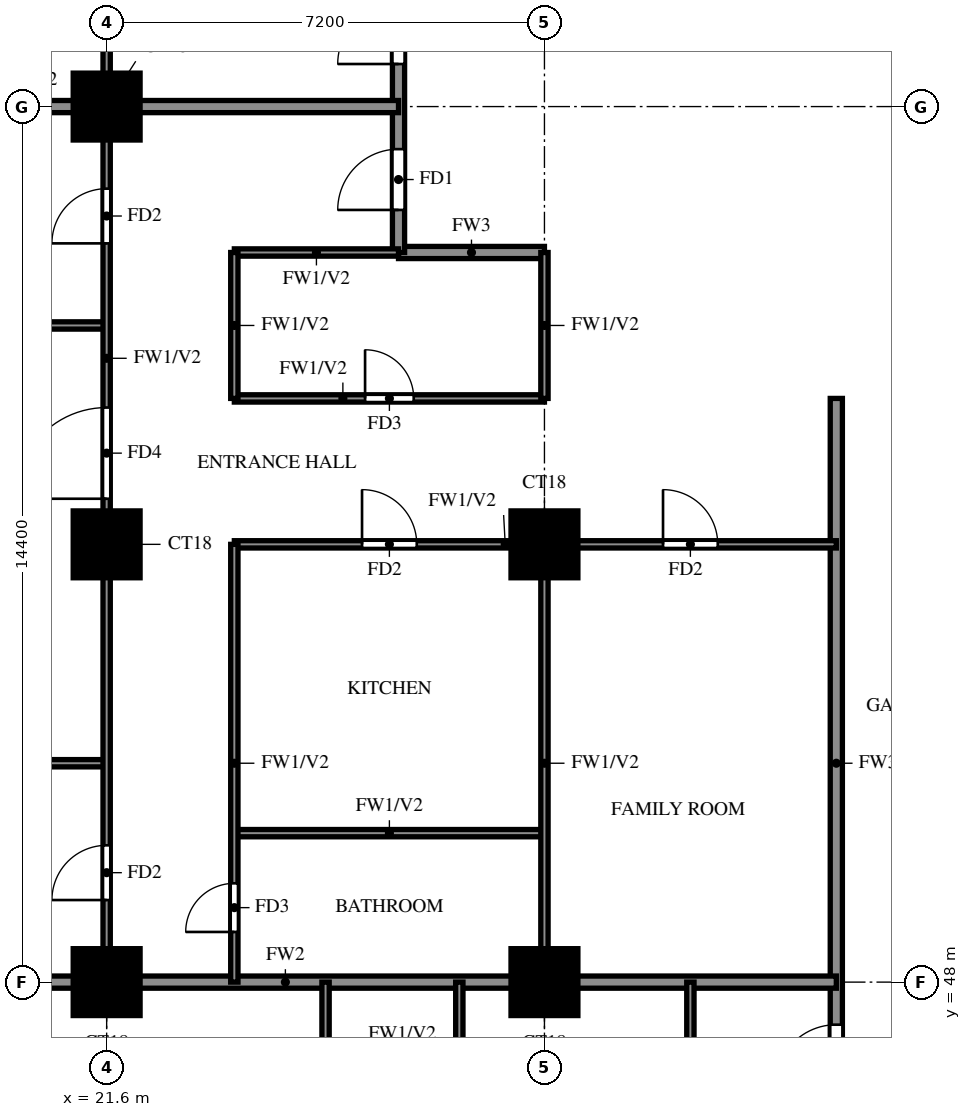
"""IFC4 building model, lengths in metres.
Left out: names, types, materials, properties, quantities, classifications, styles, units other than length and angle.
Written with IfcOpenShell. Run it as: python <this file> out.ifc"""

import sys

from ifc_helpers import new_model, si_unit, direction, frame, frame_2d, origin, origin_2d, place, context, subcontext, project, spatial, rectangle, extrude, source, transform, mapped, element, fill, save


model = new_model("IFC4")
c1 = context("Model", 3, precision=1e-05, world=origin(), true_north=direction((0.0, 1.0)))
c2 = subcontext(c1, "Body", "Model", "MODEL_VIEW")
j1 = project(units=[si_unit("LENGTHUNIT", "METRE"), si_unit("PLANEANGLEUNIT", "RADIAN")], contexts=[c1])
p1 = place(None, origin())
s1 = spatial("IfcSite", under=j1, at=p1, CompositionType="ELEMENT")
p2 = place(p1, origin())
s2 = spatial("IfcBuilding", under=s1, at=p2, CompositionType="ELEMENT")
p3 = place(p2, frame((0.0, 0.0, 116.5)))
s3 = spatial("IfcBuildingStorey", under=s2, at=p3, CompositionType="ELEMENT", Elevation=116.5)
m1 = source(origin(), c2, "Body", "SweptSolid", [
    extrude(rectangle(XDim=1.1, YDim=1.1, at=origin_2d()), origin(), (0.0, 0.0, 1.0), 3.2),
])
for number, where, z_axis, x_axis in (
    (1, (21.6, 48.0, 0.0), (0.0, 0.0, 1.0), (1.0, 0.0, 0.0)),
    (2, (28.8, 48.0, 0.0), (0.0, 0.0, 1.0), (1.0, 0.0, 0.0)),
    (3, (21.6, 55.2, 0.0), (0.0, 0.0, 1.0), (1.0, 0.0, 0.0)),
    (4, (28.8, 55.2, 0.0), (0.0, 0.0, 1.0), (1.0, 0.0, 0.0)),
    (5, (21.6, 62.4, 0.0), (0.0, 0.0, 1.0), (1.0, 0.0, 0.0)),
):
    element("IfcColumn", number, at=place(p3, frame(where, z_axis=z_axis, x_axis=x_axis)), inside=s3, PredefinedType="COLUMN", context=c2, shape_type="MappedRepresentation", body=[
        mapped(m1, transform((0.0, 0.0, 0.0))),
    ])
p4 = place(p3, frame((26.4, 60.0, 0.0), z_axis=(0.0, 0.0, 1.0), x_axis=(1.0, 0.0, 0.0)))
e6 = element("IfcWall", 6, at=p4, inside=s3, PredefinedType="SOLIDWALL", context=c2, shape_type="SweptSolid", body=[
    extrude(rectangle(XDim=2.4, YDim=0.2, at=frame_2d((1.2, 0.0))), origin(), (0.0, 0.0, 1.0), 3.2),
])
p5 = place(p3, frame((26.4, 60.0, 0.0), z_axis=(0.0, 0.0, 1.0), x_axis=(0.0, 1.0, 0.0)))
e7 = element("IfcWall", 7, at=p5, inside=s3, PredefinedType="SOLIDWALL", context=c2, shape_type="SweptSolid", body=[
    extrude(rectangle(XDim=9.6, YDim=0.2, at=frame_2d((4.8, 0.0))), origin(), (0.0, 0.0, 1.0), 3.2),
])
p6 = place(p5, frame((0.7, 0.0, 0.0)))
e8 = element("IfcOpeningElement", 8, at=p6, cuts=e7, PredefinedType="OPENING", context=c2, shape_type="SweptSolid", body=[
    extrude(rectangle(XDim=1.0, YDim=2.1, at=frame_2d((0.5, 1.05))), frame((0.0, 0.11, 0.0), z_axis=(0.0, -1.0, 0.0), x_axis=(1.0, 0.0, 0.0)), (0.0, 0.0, 1.0), 0.22),
])
p7 = place(p5, frame((3.1, 0.0, 0.0)))
e9 = element("IfcOpeningElement", 9, at=p7, cuts=e7, PredefinedType="OPENING", context=c2, shape_type="SweptSolid", body=[
    extrude(rectangle(XDim=1.0, YDim=2.1, at=frame_2d((0.5, 1.05))), frame((0.0, 0.11, 0.0), z_axis=(0.0, -1.0, 0.0), x_axis=(1.0, 0.0, 0.0)), (0.0, 0.0, 1.0), 0.22),
])
p8 = place(p3, frame((33.6, 45.6, 0.0), z_axis=(0.0, 0.0, 1.0), x_axis=(0.0, 1.0, 0.0)))
e10 = element("IfcWall", 10, at=p8, inside=s3, PredefinedType="SOLIDWALL", context=c2, shape_type="SweptSolid", body=[
    extrude(rectangle(XDim=12.0, YDim=0.2, at=frame_2d((6.0, 0.0))), origin(), (0.0, 0.0, 1.0), 3.2),
])
p9 = place(p8, frame((0.7, 0.0, 0.0)))
e11 = element("IfcOpeningElement", 11, at=p9, cuts=e10, PredefinedType="OPENING", context=c2, shape_type="SweptSolid", body=[
    extrude(rectangle(XDim=1.0, YDim=2.1, at=frame_2d((0.5, 1.05))), frame((0.0, 0.11, 0.0), z_axis=(0.0, -1.0, 0.0), x_axis=(1.0, 0.0, 0.0)), (0.0, 0.0, 1.0), 0.22),
])
p10 = place(p3, frame((14.525, 48.0, 0.0), z_axis=(0.0, 0.0, 1.0), x_axis=(1.0, 0.0, 0.0)))
e12 = element("IfcWall", 12, at=p10, inside=s3, PredefinedType="SOLIDWALL", context=c2, shape_type="SweptSolid", body=[
    extrude(rectangle(XDim=19.075, YDim=0.2, at=frame_2d((9.538, 0.0))), origin(), (0.0, 0.0, 1.0), 3.2),
])
p11 = place(p3, frame((14.525, 62.4, 0.0), z_axis=(0.0, 0.0, 1.0), x_axis=(1.0, 0.0, 0.0)))
e13 = element("IfcWall", 13, at=p11, inside=s3, PredefinedType="SOLIDWALL", context=c2, shape_type="SweptSolid", body=[
    extrude(rectangle(XDim=11.875, YDim=0.2, at=frame_2d((5.938, 0.0))), origin(), (0.0, 0.0, 1.0), 3.2),
])
p12 = place(p3, frame((23.7, 50.45, 0.0), z_axis=(0.0, 0.0, 1.0), x_axis=(1.0, 0.0, 0.0)))
e14 = element("IfcWall", 14, at=p12, inside=s3, PredefinedType="PARTITIONING", context=c2, shape_type="SweptSolid", body=[
    extrude(rectangle(XDim=5.1, YDim=0.12, at=frame_2d((2.55, 0.0))), origin(), (0.0, 0.0, 1.0), 3.2),
])
p13 = place(p3, frame((14.525, 51.6, 0.0), z_axis=(0.0, 0.0, 1.0), x_axis=(1.0, 0.0, 0.0)))
e15 = element("IfcWall", 15, at=p13, inside=s3, PredefinedType="PARTITIONING", context=c2, shape_type="SweptSolid", body=[
    extrude(rectangle(XDim=7.075, YDim=0.12, at=frame_2d((3.538, 0.0))), origin(), (0.0, 0.0, 1.0), 2.3),
])
p14 = place(p3, frame((23.7, 55.2, 0.0), z_axis=(0.0, 0.0, 1.0), x_axis=(1.0, 0.0, 0.0)))
e16 = element("IfcWall", 16, at=p14, inside=s3, PredefinedType="PARTITIONING", context=c2, shape_type="SweptSolid", body=[
    extrude(rectangle(XDim=9.9, YDim=0.12, at=frame_2d((4.95, 0.0))), origin(), (0.0, 0.0, 1.0), 3.2),
])
p15 = place(p14, frame((2.1, 0.0, 0.0)))
e17 = element("IfcOpeningElement", 17, at=p15, cuts=e16, PredefinedType="OPENING", context=c2, shape_type="SweptSolid", body=[
    extrude(rectangle(XDim=0.9, YDim=2.1, at=frame_2d((0.45, 1.05))), frame((0.0, 0.07, 0.0), z_axis=(0.0, -1.0, 0.0), x_axis=(1.0, 0.0, 0.0)), (0.0, 0.0, 1.0), 0.14),
])
p16 = place(p14, frame((7.05, 0.0, 0.0)))
e18 = element("IfcOpeningElement", 18, at=p16, cuts=e16, PredefinedType="OPENING", context=c2, shape_type="SweptSolid", body=[
    extrude(rectangle(XDim=0.9, YDim=2.1, at=frame_2d((0.45, 1.05))), frame((0.0, 0.07, 0.0), z_axis=(0.0, -1.0, 0.0), x_axis=(1.0, 0.0, 0.0)), (0.0, 0.0, 1.0), 0.14),
])
p17 = place(p3, frame((23.7, 57.6, 0.0), z_axis=(0.0, 0.0, 1.0), x_axis=(1.0, 0.0, 0.0)))
e19 = element("IfcWall", 19, at=p17, inside=s3, PredefinedType="PARTITIONING", context=c2, shape_type="SweptSolid", body=[
    extrude(rectangle(XDim=5.1, YDim=0.12, at=frame_2d((2.55, 0.0))), origin(), (0.0, 0.0, 1.0), 3.2),
])
p18 = place(p17, frame((2.15, 0.0, 0.0)))
e20 = element("IfcOpeningElement", 20, at=p18, cuts=e19, PredefinedType="OPENING", context=c2, shape_type="SweptSolid", body=[
    extrude(rectangle(XDim=0.8, YDim=2.1, at=frame_2d((0.4, 1.05))), frame((0.0, 0.07, 0.0), z_axis=(0.0, -1.0, 0.0), x_axis=(1.0, 0.0, 0.0)), (0.0, 0.0, 1.0), 0.14),
])
p19 = place(p3, frame((14.525, 58.8, 0.0), z_axis=(0.0, 0.0, 1.0), x_axis=(1.0, 0.0, 0.0)))
e21 = element("IfcWall", 21, at=p19, inside=s3, PredefinedType="PARTITIONING", context=c2, shape_type="SweptSolid", body=[
    extrude(rectangle(XDim=7.075, YDim=0.12, at=frame_2d((3.538, 0.0))), origin(), (0.0, 0.0, 1.0), 2.3),
])
p20 = place(p3, frame((23.7, 60.0, 0.0), z_axis=(0.0, 0.0, 1.0), x_axis=(1.0, 0.0, 0.0)))
e22 = element("IfcWall", 22, at=p20, inside=s3, PredefinedType="PARTITIONING", context=c2, shape_type="SweptSolid", body=[
    extrude(rectangle(XDim=2.7, YDim=0.12, at=frame_2d((1.35, 0.0))), origin(), (0.0, 0.0, 1.0), 3.2),
])
p21 = place(p3, frame((21.6, 48.0, 0.0), z_axis=(0.0, 0.0, 1.0), x_axis=(0.0, 1.0, 0.0)))
e23 = element("IfcWall", 23, at=p21, inside=s3, PredefinedType="PARTITIONING", context=c2, shape_type="SweptSolid", body=[
    extrude(rectangle(XDim=21.6, YDim=0.12, at=frame_2d((10.8, 0.0))), origin(), (0.0, 0.0, 1.0), 3.2),
])
p22 = place(p21, frame((1.35, 0.0, 0.0)))
e24 = element("IfcOpeningElement", 24, at=p22, cuts=e23, PredefinedType="OPENING", context=c2, shape_type="SweptSolid", body=[
    extrude(rectangle(XDim=0.9, YDim=2.1, at=frame_2d((0.45, 1.05))), frame((0.0, 0.07, 0.0), z_axis=(0.0, -1.0, 0.0), x_axis=(1.0, 0.0, 0.0)), (0.0, 0.0, 1.0), 0.14),
])
p23 = place(p21, frame((7.95, 0.0, 0.0)))
e25 = element("IfcOpeningElement", 25, at=p23, cuts=e23, PredefinedType="OPENING", context=c2, shape_type="SweptSolid", body=[
    extrude(rectangle(XDim=1.5, YDim=2.1, at=frame_2d((0.75, 1.05))), frame((0.0, 0.07, 0.0), z_axis=(0.0, -1.0, 0.0), x_axis=(1.0, 0.0, 0.0)), (0.0, 0.0, 1.0), 0.14),
])
p24 = place(p21, frame((12.15, 0.0, 0.0)))
e26 = element("IfcOpeningElement", 26, at=p24, cuts=e23, PredefinedType="OPENING", context=c2, shape_type="SweptSolid", body=[
    extrude(rectangle(XDim=0.9, YDim=2.1, at=frame_2d((0.45, 1.05))), frame((0.0, 0.07, 0.0), z_axis=(0.0, -1.0, 0.0), x_axis=(1.0, 0.0, 0.0)), (0.0, 0.0, 1.0), 0.14),
])
p25 = place(p21, frame((15.75, 0.0, 0.0)))
e27 = element("IfcOpeningElement", 27, at=p25, cuts=e23, PredefinedType="OPENING", context=c2, shape_type="SweptSolid", body=[
    extrude(rectangle(XDim=0.9, YDim=2.1, at=frame_2d((0.45, 1.05))), frame((0.0, 0.07, 0.0), z_axis=(0.0, -1.0, 0.0), x_axis=(1.0, 0.0, 0.0)), (0.0, 0.0, 1.0), 0.14),
])
p26 = place(p21, frame((19.35, 0.0, 0.0)))
e28 = element("IfcOpeningElement", 28, at=p26, cuts=e23, PredefinedType="OPENING", context=c2, shape_type="SweptSolid", body=[
    extrude(rectangle(XDim=0.9, YDim=2.1, at=frame_2d((0.45, 1.05))), frame((0.0, 0.07, 0.0), z_axis=(0.0, -1.0, 0.0), x_axis=(1.0, 0.0, 0.0)), (0.0, 0.0, 1.0), 0.14),
])
p27 = place(p3, frame((23.7, 48.0, 0.0), z_axis=(0.0, 0.0, 1.0), x_axis=(0.0, 1.0, 0.0)))
e29 = element("IfcWall", 29, at=p27, inside=s3, PredefinedType="PARTITIONING", context=c2, shape_type="SweptSolid", body=[
    extrude(rectangle(XDim=7.2, YDim=0.12, at=frame_2d((3.6, 0.0))), origin(), (0.0, 0.0, 1.0), 3.2),
])
p28 = place(p27, frame((0.825, 0.0, 0.0)))
e30 = element("IfcOpeningElement", 30, at=p28, cuts=e29, PredefinedType="OPENING", context=c2, shape_type="SweptSolid", body=[
    extrude(rectangle(XDim=0.8, YDim=2.1, at=frame_2d((0.4, 1.05))), frame((0.0, 0.07, 0.0), z_axis=(0.0, -1.0, 0.0), x_axis=(1.0, 0.0, 0.0)), (0.0, 0.0, 1.0), 0.14),
])
p29 = place(p3, frame((23.7, 57.6, 0.0), z_axis=(0.0, 0.0, 1.0), x_axis=(0.0, 1.0, 0.0)))
e31 = element("IfcWall", 31, at=p29, inside=s3, PredefinedType="PARTITIONING", context=c2, shape_type="SweptSolid", body=[
    extrude(rectangle(XDim=2.4, YDim=0.12, at=frame_2d((1.2, 0.0))), origin(), (0.0, 0.0, 1.0), 3.2),
])
p30 = place(p3, frame((25.2, 39.725, 0.0), z_axis=(0.0, 0.0, 1.0), x_axis=(0.0, 1.0, 0.0)))
e32 = element("IfcWall", 32, at=p30, inside=s3, PredefinedType="PARTITIONING", context=c2, shape_type="SweptSolid", body=[
    extrude(rectangle(XDim=8.275, YDim=0.12, at=frame_2d((4.137, 0.0))), origin(), (0.0, 0.0, 1.0), 3.2),
])
p31 = place(p30, frame((4.525, 0.0, 0.0)))
e33 = element("IfcOpeningElement", 33, at=p31, cuts=e32, PredefinedType="OPENING", context=c2, shape_type="SweptSolid", body=[
    extrude(rectangle(XDim=0.9, YDim=2.1, at=frame_2d((0.45, 1.05))), frame((0.0, 0.07, 0.0), z_axis=(0.0, -1.0, 0.0), x_axis=(1.0, 0.0, 0.0)), (0.0, 0.0, 1.0), 0.14),
])
p32 = place(p3, frame((27.4, 45.6, 0.0), z_axis=(0.0, 0.0, 1.0), x_axis=(0.0, 1.0, 0.0)))
e34 = element("IfcWall", 34, at=p32, inside=s3, PredefinedType="PARTITIONING", context=c2, shape_type="SweptSolid", body=[
    extrude(rectangle(XDim=2.4, YDim=0.12, at=frame_2d((1.2, 0.0))), origin(), (0.0, 0.0, 1.0), 3.2),
])
p33 = place(p3, frame((28.8, 48.0, 0.0), z_axis=(0.0, 0.0, 1.0), x_axis=(0.0, 1.0, 0.0)))
e35 = element("IfcWall", 35, at=p33, inside=s3, PredefinedType="PARTITIONING", context=c2, shape_type="SweptSolid", body=[
    extrude(rectangle(XDim=7.2, YDim=0.12, at=frame_2d((3.6, 0.0))), origin(), (0.0, 0.0, 1.0), 3.2),
])
for number, where, z_axis, x_axis in (
    (36, (28.8, 57.6, 0.0), (0.0, 0.0, 1.0), (0.0, 1.0, 0.0)),
    (37, (31.2, 45.6, 0.0), (0.0, 0.0, 1.0), (0.0, 1.0, 0.0)),
):
    element("IfcWall", number, at=place(p3, frame(where, z_axis=z_axis, x_axis=x_axis)), inside=s3, PredefinedType="PARTITIONING", context=c2, shape_type="SweptSolid", body=[
        extrude(rectangle(XDim=2.4, YDim=0.12, at=frame_2d((1.2, 0.0))), origin(), (0.0, 0.0, 1.0), 3.2),
    ])
p34 = place(p9, origin())
e38 = element("IfcDoor", 38, at=p34, inside=s3, OperationType="SINGLE_SWING_RIGHT", PredefinedType="DOOR", context=c2, shape_type="SweptSolid", body=[
    extrude(rectangle(XDim=1.0, YDim=2.1, at=frame_2d((0.5, 1.05))), frame((0.0, 0.025, 0.0), z_axis=(0.0, -1.0, 0.0), x_axis=(1.0, 0.0, 0.0)), (0.0, 0.0, 1.0), 0.05),
])
fill(e11, e38)
p35 = place(p6, origin())
e39 = element("IfcDoor", 39, at=p35, inside=s3, OperationType="SINGLE_SWING_LEFT", PredefinedType="DOOR", context=c2, shape_type="SweptSolid", body=[
    extrude(rectangle(XDim=1.0, YDim=2.1, at=frame_2d((0.5, 1.05))), frame((0.0, 0.025, 0.0), z_axis=(0.0, -1.0, 0.0), x_axis=(1.0, 0.0, 0.0)), (0.0, 0.0, 1.0), 0.05),
])
fill(e8, e39)
p36 = place(p22, origin())
e40 = element("IfcDoor", 40, at=p36, inside=s3, OperationType="SINGLE_SWING_LEFT", PredefinedType="DOOR", context=c2, shape_type="SweptSolid", body=[
    extrude(rectangle(XDim=0.9, YDim=2.1, at=frame_2d((0.45, 1.05))), frame((0.0, 0.025, 0.0), z_axis=(0.0, -1.0, 0.0), x_axis=(1.0, 0.0, 0.0)), (0.0, 0.0, 1.0), 0.05),
])
fill(e24, e40)
p37 = place(p23, origin())
e41 = element("IfcDoor", 41, at=p37, inside=s3, OperationType="SINGLE_SWING_LEFT", PredefinedType="DOOR", context=c2, shape_type="SweptSolid", body=[
    extrude(rectangle(XDim=1.5, YDim=2.1, at=frame_2d((0.75, 1.05))), frame((0.0, 0.025, 0.0), z_axis=(0.0, -1.0, 0.0), x_axis=(1.0, 0.0, 0.0)), (0.0, 0.0, 1.0), 0.05),
])
fill(e25, e41)
p38 = place(p24, origin())
e42 = element("IfcDoor", 42, at=p38, inside=s3, OperationType="SINGLE_SWING_LEFT", PredefinedType="DOOR", context=c2, shape_type="SweptSolid", body=[
    extrude(rectangle(XDim=0.9, YDim=2.1, at=frame_2d((0.45, 1.05))), frame((0.0, 0.025, 0.0), z_axis=(0.0, -1.0, 0.0), x_axis=(1.0, 0.0, 0.0)), (0.0, 0.0, 1.0), 0.05),
])
fill(e26, e42)
p39 = place(p28, origin())
e43 = element("IfcDoor", 43, at=p39, inside=s3, OperationType="SINGLE_SWING_LEFT", PredefinedType="DOOR", context=c2, shape_type="SweptSolid", body=[
    extrude(rectangle(XDim=0.8, YDim=2.1, at=frame_2d((0.4, 1.05))), frame((0.0, 0.025, 0.0), z_axis=(0.0, -1.0, 0.0), x_axis=(1.0, 0.0, 0.0)), (0.0, 0.0, 1.0), 0.05),
])
fill(e30, e43)
p40 = place(p15, origin())
e44 = element("IfcDoor", 44, at=p40, inside=s3, OperationType="SINGLE_SWING_RIGHT", PredefinedType="DOOR", context=c2, shape_type="SweptSolid", body=[
    extrude(rectangle(XDim=0.9, YDim=2.1, at=frame_2d((0.45, 1.05))), frame((0.0, 0.025, 0.0), z_axis=(0.0, -1.0, 0.0), x_axis=(1.0, 0.0, 0.0)), (0.0, 0.0, 1.0), 0.05),
])
fill(e17, e44)
p41 = place(p18, origin())
e45 = element("IfcDoor", 45, at=p41, inside=s3, OperationType="SINGLE_SWING_LEFT", PredefinedType="DOOR", context=c2, shape_type="SweptSolid", body=[
    extrude(rectangle(XDim=0.8, YDim=2.1, at=frame_2d((0.4, 1.05))), frame((0.0, 0.025, 0.0), z_axis=(0.0, -1.0, 0.0), x_axis=(1.0, 0.0, 0.0)), (0.0, 0.0, 1.0), 0.05),
])
fill(e20, e45)
p42 = place(p16, origin())
e46 = element("IfcDoor", 46, at=p42, inside=s3, OperationType="SINGLE_SWING_LEFT", PredefinedType="DOOR", context=c2, shape_type="SweptSolid", body=[
    extrude(rectangle(XDim=0.9, YDim=2.1, at=frame_2d((0.45, 1.05))), frame((0.0, 0.025, 0.0), z_axis=(0.0, -1.0, 0.0), x_axis=(1.0, 0.0, 0.0)), (0.0, 0.0, 1.0), 0.05),
])
fill(e18, e46)
p43 = place(p7, origin())
e47 = element("IfcDoor", 47, at=p43, inside=s3, OperationType="SINGLE_SWING_RIGHT", PredefinedType="DOOR", context=c2, shape_type="SweptSolid", body=[
    extrude(rectangle(XDim=1.0, YDim=2.1, at=frame_2d((0.5, 1.05))), frame((0.0, 0.025, 0.0), z_axis=(0.0, -1.0, 0.0), x_axis=(1.0, 0.0, 0.0)), (0.0, 0.0, 1.0), 0.05),
])
fill(e9, e47)
save(model, sys.argv[1])
